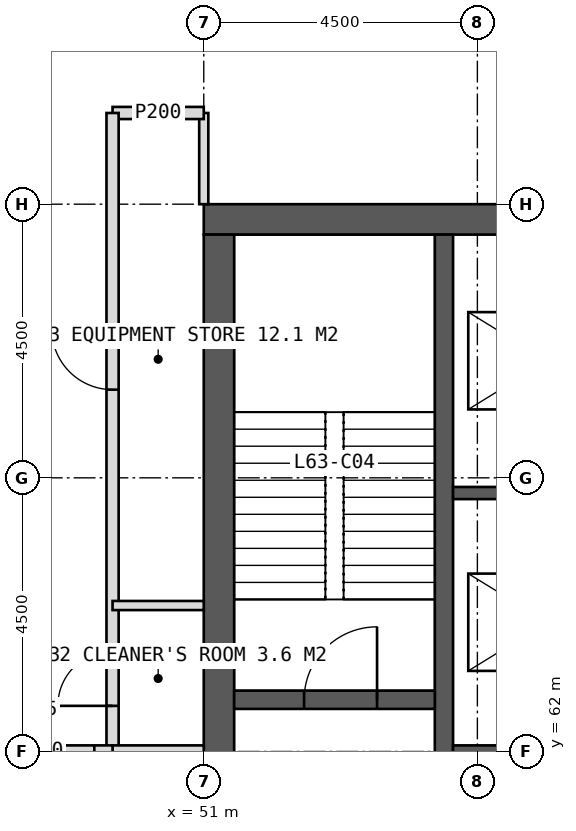
"""IFC4 building model, lengths in metres.
Left out: names, types, materials, properties, quantities, classifications, styles, units other than length and angle.
Written with IfcOpenShell. Run it as: python <this file> out.ifc"""

import sys

from ifc_helpers import new_model, si_unit, direction, frame, frame_2d, origin, place, context, subcontext, project, spatial, rectangle, extrude, element, fill, save


model = new_model("IFC4")
c1 = context("Model", 3, precision=1e-05, world=origin(), true_north=direction((0.0, 1.0)))
c2 = subcontext(c1, "Body", "Model", "MODEL_VIEW")
j1 = project(units=[si_unit("LENGTHUNIT", "METRE"), si_unit("PLANEANGLEUNIT", "RADIAN")], contexts=[c1])
p1 = place(None, origin())
s1 = spatial("IfcSite", under=j1, at=p1, CompositionType="ELEMENT")
p2 = place(p1, origin())
s2 = spatial("IfcBuilding", under=s1, at=p2, CompositionType="ELEMENT")
p3 = place(p2, frame((0.0, 0.0, 262.0)))
s3 = spatial("IfcBuildingStorey", under=s2, at=p3, CompositionType="ELEMENT", Elevation=262.0)
p4 = place(p3, frame((51.0, 70.75, 0.0), z_axis=(0.0, 0.0, 1.0), x_axis=(1.0, 0.0, 0.0)))
e1 = element("IfcWall", 1, at=p4, inside=s3, PredefinedType="SHEAR", context=c2, shape_type="SweptSolid", body=[
    extrude(rectangle(XDim=18.0, YDim=0.5, at=frame_2d((9.0, 0.0))), origin(), (0.0, 0.0, 1.0), 4.0),
])
p5 = place(p4, frame((8.1, 0.0, 0.0)))
e2 = element("IfcOpeningElement", 2, at=p5, cuts=e1, PredefinedType="OPENING", context=c2, shape_type="SweptSolid", body=[
    extrude(rectangle(XDim=1.8, YDim=2.2, at=frame_2d((0.9, 1.1))), frame((0.0, 0.26, 0.0), z_axis=(0.0, -1.0, 0.0), x_axis=(1.0, 0.0, 0.0)), (0.0, 0.0, 1.0), 0.52),
])
p6 = place(p3, frame((51.25, 53.5, 0.0), z_axis=(0.0, 0.0, 1.0), x_axis=(0.0, 1.0, 0.0)))
e3 = element("IfcWall", 3, at=p6, inside=s3, PredefinedType="SHEAR", context=c2, shape_type="SweptSolid", body=[
    extrude(rectangle(XDim=17.0, YDim=0.5, at=frame_2d((8.5, 0.0))), origin(), (0.0, 0.0, 1.0), 4.0),
])
p7 = place(p6, frame((6.1, 0.0, 0.0)))
e4 = element("IfcOpeningElement", 4, at=p7, cuts=e3, PredefinedType="OPENING", context=c2, shape_type="SweptSolid", body=[
    extrude(rectangle(XDim=1.5, YDim=2.2, at=frame_2d((0.75, 1.1))), frame((0.0, 0.26, 0.0), z_axis=(0.0, -1.0, 0.0), x_axis=(1.0, 0.0, 0.0)), (0.0, 0.0, 1.0), 0.52),
])
p8 = place(p3, frame((54.95, 53.5, 0.0), z_axis=(0.0, 0.0, 1.0), x_axis=(0.0, 1.0, 0.0)))
e5 = element("IfcWall", 5, at=p8, inside=s3, PredefinedType="SHEAR", context=c2, shape_type="SweptSolid", body=[
    extrude(rectangle(XDim=17.0, YDim=0.3, at=frame_2d((8.5, 0.0))), origin(), (0.0, 0.0, 1.0), 4.0),
])
for number, where, z_axis, x_axis in (
    (6, (55.1, 62.0, 0.0), (0.0, 0.0, 1.0), (1.0, 0.0, 0.0)),
    (7, (55.1, 66.25, 0.0), (0.0, 0.0, 1.0), (1.0, 0.0, 0.0)),
):
    element("IfcWall", number, at=place(p3, frame(where, z_axis=z_axis, x_axis=x_axis)), inside=s3, PredefinedType="SHEAR", context=c2, shape_type="SweptSolid", body=[
        extrude(rectangle(XDim=3.05, YDim=0.2, at=frame_2d((1.525, 0.0))), origin(), (0.0, 0.0, 1.0), 4.0),
    ])
p9 = place(p3, frame((51.5, 62.85, 0.0), z_axis=(0.0, 0.0, 1.0), x_axis=(1.0, 0.0, 0.0)))
e8 = element("IfcWall", 8, at=p9, inside=s3, PredefinedType="SHEAR", context=c2, shape_type="SweptSolid", body=[
    extrude(rectangle(XDim=3.3, YDim=0.3, at=frame_2d((1.65, 0.0))), origin(), (0.0, 0.0, 1.0), 4.0),
])
p10 = place(p9, frame((1.15, 0.0, 0.0)))
e9 = element("IfcOpeningElement", 9, at=p10, cuts=e8, PredefinedType="OPENING", context=c2, shape_type="SweptSolid", body=[
    extrude(rectangle(XDim=1.2, YDim=2.1, at=frame_2d((0.6, 1.05))), frame((0.0, 0.16, 0.0), z_axis=(0.0, -1.0, 0.0), x_axis=(1.0, 0.0, 0.0)), (0.0, 0.0, 1.0), 0.32),
])
p11 = place(p3, frame((51.0, 71.0, 0.0), z_axis=(0.0, 0.0, 1.0), x_axis=(0.0, 1.0, 0.0)))
e10 = element("IfcWall", 10, at=p11, inside=s3, PredefinedType="PARTITIONING", context=c2, shape_type="SweptSolid", body=[
    extrude(rectangle(XDim=1.5, YDim=0.15, at=frame_2d((0.75, 0.0))), origin(), (0.0, 0.0, 1.0), 3.75),
])
p12 = place(p3, frame((49.5, 72.5, 0.0), z_axis=(0.0, 0.0, 1.0), x_axis=(1.0, 0.0, 0.0)))
e11 = element("IfcWall", 11, at=p12, inside=s3, PredefinedType="PARTITIONING", context=c2, shape_type="SweptSolid", body=[
    extrude(rectangle(XDim=1.5, YDim=0.2, at=frame_2d((0.75, 0.0))), origin(), (0.0, 0.0, 1.0), 3.75),
])
p13 = place(p3, frame((49.5, 62.0, 0.0), z_axis=(0.0, 0.0, 1.0), x_axis=(0.0, 1.0, 0.0)))
e12 = element("IfcWall", 12, at=p13, inside=s3, PredefinedType="PARTITIONING", context=c2, shape_type="SweptSolid", body=[
    extrude(rectangle(XDim=10.5, YDim=0.2, at=frame_2d((5.25, 0.0))), origin(), (0.0, 0.0, 1.0), 3.75),
])
p14 = place(p13, frame((0.75, 0.0, 0.0)))
e13 = element("IfcOpeningElement", 13, at=p14, cuts=e12, PredefinedType="OPENING", context=c2, shape_type="SweptSolid", body=[
    extrude(rectangle(XDim=0.9, YDim=2.1, at=frame_2d((0.45, 1.05))), frame((0.0, 0.11, 0.0), z_axis=(0.0, -1.0, 0.0), x_axis=(1.0, 0.0, 0.0)), (0.0, 0.0, 1.0), 0.22),
])
p15 = place(p13, frame((5.95, 0.0, 0.0)))
e14 = element("IfcOpeningElement", 14, at=p15, cuts=e12, PredefinedType="OPENING", context=c2, shape_type="SweptSolid", body=[
    extrude(rectangle(XDim=1.0, YDim=2.1, at=frame_2d((0.5, 1.05))), frame((0.0, 0.11, 0.0), z_axis=(0.0, -1.0, 0.0), x_axis=(1.0, 0.0, 0.0)), (0.0, 0.0, 1.0), 0.22),
])
p16 = place(p3, frame((51.0, 62.0, 0.0), z_axis=(0.0, 0.0, 1.0), x_axis=(-1.0, 0.0, 0.0)))
e15 = element("IfcWall", 15, at=p16, inside=s3, PredefinedType="SOLIDWALL", context=c2, shape_type="SweptSolid", body=[
    extrude(rectangle(XDim=1.5, YDim=0.2, at=frame_2d((0.75, 0.0))), origin(), (0.0, 0.0, 1.0), 2.75),
])
p17 = place(p3, frame((51.0, 64.4, 0.0), z_axis=(0.0, 0.0, 1.0), x_axis=(-1.0, 0.0, 0.0)))
e16 = element("IfcWall", 16, at=p17, inside=s3, PredefinedType="PARTITIONING", context=c2, shape_type="SweptSolid", body=[
    extrude(rectangle(XDim=1.5, YDim=0.15, at=frame_2d((0.75, 0.0))), origin(), (0.0, 0.0, 1.0), 3.75),
])
p18 = place(p3, frame((49.5, 62.0, 0.0), z_axis=(0.0, 0.0, 1.0), x_axis=(-1.0, 0.0, 0.0)))
e17 = element("IfcWall", 17, at=p18, inside=s3, PredefinedType="SOLIDWALL", context=c2, shape_type="SweptSolid", body=[
    extrude(rectangle(XDim=2.6, YDim=0.2, at=frame_2d((1.3, 0.0))), origin(), (0.0, 0.0, 1.0), 2.75),
])
p19 = place(p18, frame((0.3, 0.0, 0.0)))
e18 = element("IfcOpeningElement", 18, at=p19, cuts=e17, PredefinedType="OPENING", context=c2, shape_type="SweptSolid", body=[
    extrude(rectangle(XDim=1.8, YDim=2.2, at=frame_2d((0.9, 1.1))), frame((0.0, 0.11, 0.0), z_axis=(0.0, -1.0, 0.0), x_axis=(1.0, 0.0, 0.0)), (0.0, 0.0, 1.0), 0.22),
])
p20 = place(p14, origin())
e19 = element("IfcDoor", 19, at=p20, inside=s3, OperationType="SINGLE_SWING_LEFT", PredefinedType="DOOR", context=c2, shape_type="SweptSolid", body=[
    extrude(rectangle(XDim=0.9, YDim=2.1, at=frame_2d((0.45, 1.05))), frame((0.0, 0.025, 0.0), z_axis=(0.0, -1.0, 0.0), x_axis=(1.0, 0.0, 0.0)), (0.0, 0.0, 1.0), 0.05),
])
fill(e13, e19)
p21 = place(p15, origin())
e20 = element("IfcDoor", 20, at=p21, inside=s3, OperationType="SINGLE_SWING_RIGHT", PredefinedType="DOOR", context=c2, shape_type="SweptSolid", body=[
    extrude(rectangle(XDim=1.0, YDim=2.1, at=frame_2d((0.5, 1.05))), frame((0.0, 0.025, 0.0), z_axis=(0.0, -1.0, 0.0), x_axis=(1.0, 0.0, 0.0)), (0.0, 0.0, 1.0), 0.05),
])
fill(e14, e20)
p22 = place(p19, origin())
e21 = element("IfcDoor", 21, at=p22, inside=s3, OperationType="DOUBLE_DOOR_DOUBLE_SWING", PredefinedType="DOOR", context=c2, shape_type="SweptSolid", body=[
    extrude(rectangle(XDim=1.8, YDim=2.2, at=frame_2d((0.9, 1.1))), frame((0.0, 0.025, 0.0), z_axis=(0.0, -1.0, 0.0), x_axis=(1.0, 0.0, 0.0)), (0.0, 0.0, 1.0), 0.05),
])
fill(e18, e21)
p23 = place(p10, origin())
e22 = element("IfcDoor", 22, at=p23, inside=s3, OperationType="SINGLE_SWING_RIGHT", PredefinedType="DOOR", context=c2, shape_type="SweptSolid", body=[
    extrude(rectangle(XDim=1.2, YDim=2.1, at=frame_2d((0.6, 1.05))), frame((0.0, 0.025, 0.0), z_axis=(0.0, -1.0, 0.0), x_axis=(1.0, 0.0, 0.0)), (0.0, 0.0, 1.0), 0.05),
])
fill(e9, e22)
save(model, sys.argv[1])
